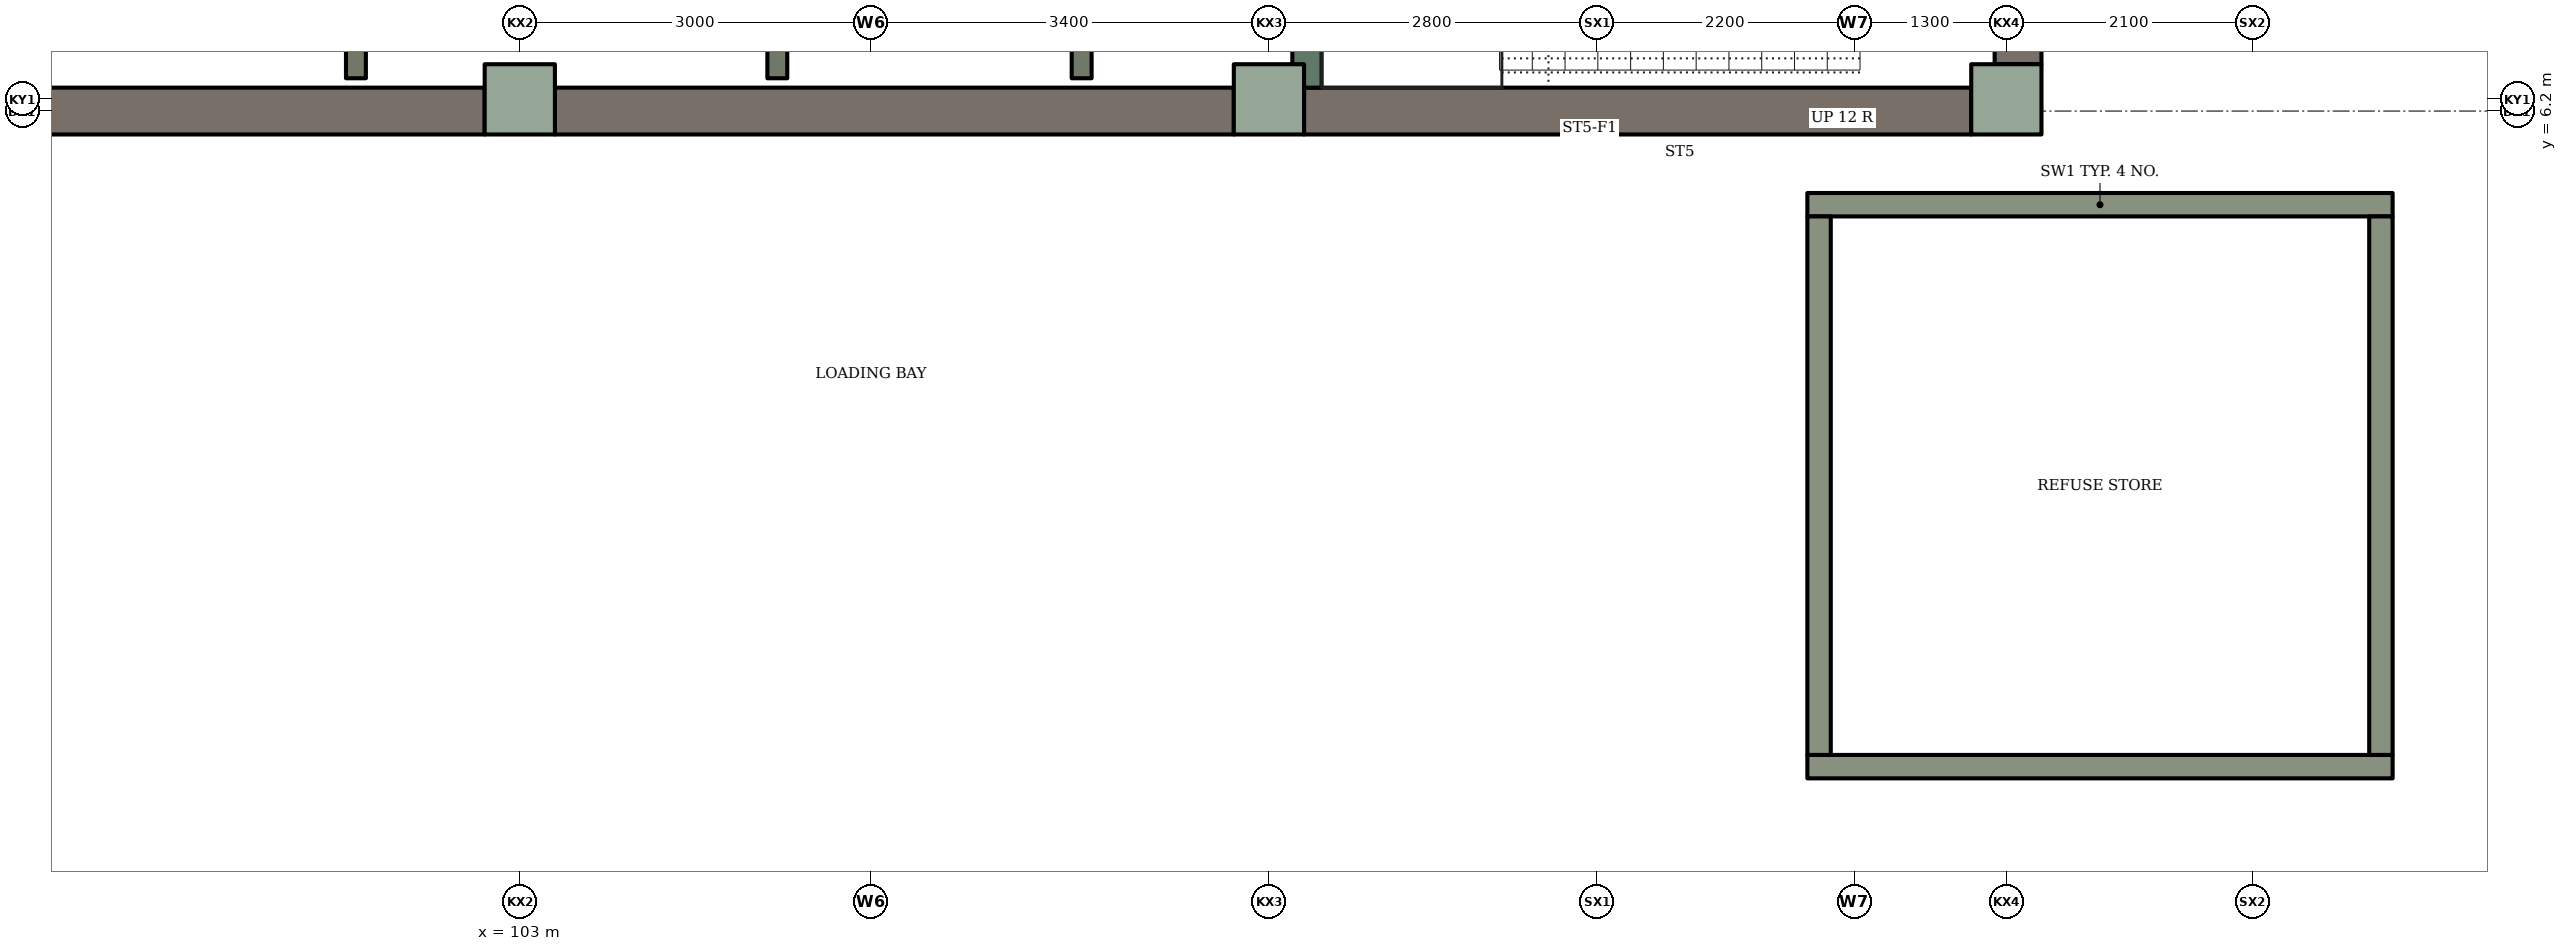
"""IFC4 building model, lengths in metres.
Left out: names, types, materials, properties, quantities, classifications, styles, units other than length and angle.
Written with IfcOpenShell. Run it as: python <this file> out.ifc"""

import sys

from ifc_helpers import new_model, si_unit, direction, frame, frame_2d, origin, origin_2d, place, context, subcontext, project, spatial, rectangle, extrude, element, fill, save


model = new_model("IFC4")
c1 = context("Model", 3, precision=1e-05, world=origin(), true_north=direction((0.0, 1.0)))
c2 = subcontext(c1, "Body", "Model", "MODEL_VIEW")
j1 = project(units=[si_unit("LENGTHUNIT", "METRE"), si_unit("PLANEANGLEUNIT", "RADIAN")], contexts=[c1])
p1 = place(None, origin())
s1 = spatial("IfcSite", under=j1, at=p1, CompositionType="ELEMENT")
p2 = place(p1, origin())
s2 = spatial("IfcBuilding", under=s1, at=p2, CompositionType="ELEMENT")
p3 = place(p2, origin())
s3 = spatial("IfcBuildingStorey", under=s2, at=p3, CompositionType="ELEMENT", Elevation=0.0)
for number, where, z_axis, x_axis in (
    (1, (103.0, 6.3, 0.0), (0.0, 0.0, 1.0), (1.0, 0.0, 0.0)),
    (2, (109.4, 6.3, 0.0), (0.0, 0.0, 1.0), (1.0, 0.0, 0.0)),
    (3, (115.7, 6.3, 0.0), (0.0, 0.0, 1.0), (1.0, 0.0, 0.0)),
):
    element("IfcColumn", number, at=place(p3, frame(where, z_axis=z_axis, x_axis=x_axis)), inside=s3, PredefinedType="COLUMN", context=c2, shape_type="SweptSolid", body=[
        extrude(rectangle(XDim=0.6, YDim=0.6, at=origin_2d()), origin(), (0.0, 0.0, 1.0), 4.2),
    ])
p4 = place(p3, frame((97.0, 6.2, 0.0), z_axis=(0.0, 0.0, 1.0), x_axis=(1.0, 0.0, 0.0)))
e4 = element("IfcWall", 4, at=p4, inside=s3, PredefinedType="SOLIDWALL", context=c2, shape_type="SweptSolid", body=[
    extrude(rectangle(XDim=5.7, YDim=0.4, at=frame_2d((2.85, 0.0))), origin(), (0.0, 0.0, 1.0), 4.2),
])
p5 = place(p4, frame((1.35, 0.0, 0.0)))
e5 = element("IfcOpeningElement", 5, at=p5, cuts=e4, PredefinedType="OPENING", context=c2, shape_type="SweptSolid", body=[
    extrude(rectangle(XDim=3.0, YDim=3.0, at=frame_2d((1.5, 1.5))), frame((0.0, 0.21, 0.0), z_axis=(0.0, -1.0, 0.0), x_axis=(1.0, 0.0, 0.0)), (0.0, 0.0, 1.0), 0.42),
])
p6 = place(p3, frame((103.3, 6.2, 0.0), z_axis=(0.0, 0.0, 1.0), x_axis=(1.0, 0.0, 0.0)))
e6 = element("IfcWall", 6, at=p6, inside=s3, PredefinedType="SOLIDWALL", context=c2, shape_type="SweptSolid", body=[
    extrude(rectangle(XDim=5.8, YDim=0.4, at=frame_2d((2.9, 0.0))), origin(), (0.0, 0.0, 1.0), 4.2),
])
p7 = place(p6, frame((4.6, 0.0, 0.0)))
e7 = element("IfcOpeningElement", 7, at=p7, cuts=e6, PredefinedType="OPENING", context=c2, shape_type="SweptSolid", body=[
    extrude(rectangle(XDim=1.0, YDim=2.1, at=frame_2d((0.5, 1.05))), frame((0.0, 0.21, 0.0), z_axis=(0.0, -1.0, 0.0), x_axis=(1.0, 0.0, 0.0)), (0.0, 0.0, 1.0), 0.42),
])
p8 = place(p3, frame((109.7, 6.2, 0.0), z_axis=(0.0, 0.0, 1.0), x_axis=(1.0, 0.0, 0.0)))
e8 = element("IfcWall", 8, at=p8, inside=s3, PredefinedType="SOLIDWALL", context=c2, shape_type="SweptSolid", body=[
    extrude(rectangle(XDim=5.7, YDim=0.4, at=frame_2d((2.85, 0.0))), origin(), (0.0, 0.0, 1.0), 4.2),
])
p9 = place(p3, frame((115.8, 12.3, 0.0), z_axis=(0.0, 0.0, 1.0), x_axis=(0.0, -1.0, 0.0)))
e9 = element("IfcWall", 9, at=p9, inside=s3, PredefinedType="SOLIDWALL", context=c2, shape_type="SweptSolid", body=[
    extrude(rectangle(XDim=5.7, YDim=0.4, at=frame_2d((2.85, 0.0))), origin(), (0.0, 0.0, 1.0), 4.2),
])
p10 = place(p9, frame((1.6, 0.0, 0.0)))
e10 = element("IfcOpeningElement", 10, at=p10, cuts=e9, PredefinedType="OPENING", context=c2, shape_type="SweptSolid", body=[
    extrude(rectangle(XDim=1.0, YDim=2.4, at=frame_2d((0.5, 1.2))), frame((0.0, 0.21, 0.0), z_axis=(0.0, -1.0, 0.0), x_axis=(1.0, 0.0, 0.0)), (0.0, 0.0, 1.0), 0.42),
])
p11 = place(p3, frame((109.725, 6.4, 0.0), z_axis=(0.0, 0.0, 1.0), x_axis=(0.0, 1.0, 0.0)))
e11 = element("IfcWall", 11, at=p11, inside=s3, PredefinedType="SHEAR", context=c2, shape_type="SweptSolid", body=[
    extrude(rectangle(XDim=5.75, YDim=0.25, at=frame_2d((2.875, 0.0))), origin(), (0.0, 0.0, 1.0), 4.2),
])
for number, where, z_axis, x_axis in (
    (12, (114.0, 0.6, 0.0), (0.0, 0.0, 1.0), (1.0, 0.0, 0.0)),
    (13, (114.0, 5.4, 0.0), (0.0, 0.0, 1.0), (1.0, 0.0, 0.0)),
):
    element("IfcWall", number, at=place(p3, frame(where, z_axis=z_axis, x_axis=x_axis)), inside=s3, PredefinedType="SOLIDWALL", context=c2, shape_type="SweptSolid", body=[
        extrude(rectangle(XDim=5.0, YDim=0.2, at=frame_2d((2.5, 0.0))), origin(), (0.0, 0.0, 1.0), 2.4),
    ])
p12 = place(p3, frame((114.1, 0.7, 0.0), z_axis=(0.0, 0.0, 1.0), x_axis=(0.0, 1.0, 0.0)))
e14 = element("IfcWall", 14, at=p12, inside=s3, PredefinedType="SOLIDWALL", context=c2, shape_type="SweptSolid", body=[
    extrude(rectangle(XDim=4.6, YDim=0.2, at=frame_2d((2.3, 0.0))), origin(), (0.0, 0.0, 1.0), 2.4),
])
p13 = place(p12, frame((1.4, 0.0, 0.0)))
e15 = element("IfcOpeningElement", 15, at=p13, cuts=e14, PredefinedType="OPENING", context=c2, shape_type="SweptSolid", body=[
    extrude(rectangle(XDim=1.8, YDim=2.1, at=frame_2d((0.9, 1.05))), frame((0.0, 0.11, 0.0), z_axis=(0.0, -1.0, 0.0), x_axis=(1.0, 0.0, 0.0)), (0.0, 0.0, 1.0), 0.22),
])
p14 = place(p3, frame((118.9, 0.7, 0.0), z_axis=(0.0, 0.0, 1.0), x_axis=(0.0, 1.0, 0.0)))
e16 = element("IfcWall", 16, at=p14, inside=s3, PredefinedType="SOLIDWALL", context=c2, shape_type="SweptSolid", body=[
    extrude(rectangle(XDim=4.6, YDim=0.2, at=frame_2d((2.3, 0.0))), origin(), (0.0, 0.0, 1.0), 2.4),
])
p15 = place(p3, frame((101.6, 6.48, 0.0), z_axis=(0.0, 0.0, 1.0), x_axis=(0.0, 1.0, 0.0)))
e17 = element("IfcWall", 17, at=p15, inside=s3, PredefinedType="PARTITIONING", context=c2, shape_type="SweptSolid", body=[
    extrude(rectangle(XDim=5.92, YDim=0.17, at=frame_2d((2.96, 0.0))), origin(), (0.0, 0.0, 1.0), 3.92),
])
p16 = place(p15, frame((2.57, 0.0, 0.0)))
e18 = element("IfcOpeningElement", 18, at=p16, cuts=e17, PredefinedType="OPENING", context=c2, shape_type="SweptSolid", body=[
    extrude(rectangle(XDim=0.8, YDim=2.1, at=frame_2d((0.4, 1.05))), frame((0.0, 0.095, 0.0), z_axis=(0.0, -1.0, 0.0), x_axis=(1.0, 0.0, 0.0)), (0.0, 0.0, 1.0), 0.19),
])
p17 = place(p3, frame((102.78, 6.4, 0.0), z_axis=(0.0, 0.0, 1.0), x_axis=(1.0, 0.0, 0.0)))
e19 = element("IfcWall", 19, at=p17, inside=s3, PredefinedType="PARTITIONING", context=c2, shape_type="SweptSolid", body=[
    extrude(rectangle(XDim=0.44, YDim=0.17, at=frame_2d((0.22, 0.0))), origin(), (0.0, 0.0, 1.0), 3.92),
])
p18 = place(p3, frame((105.2, 6.48, 0.0), z_axis=(0.0, 0.0, 1.0), x_axis=(0.0, 1.0, 0.0)))
e20 = element("IfcWall", 20, at=p18, inside=s3, PredefinedType="PARTITIONING", context=c2, shape_type="SweptSolid", body=[
    extrude(rectangle(XDim=5.92, YDim=0.17, at=frame_2d((2.96, 0.0))), origin(), (0.0, 0.0, 1.0), 3.92),
])
p19 = place(p18, frame((2.57, 0.0, 0.0)))
e21 = element("IfcOpeningElement", 21, at=p19, cuts=e20, PredefinedType="OPENING", context=c2, shape_type="SweptSolid", body=[
    extrude(rectangle(XDim=0.8, YDim=2.1, at=frame_2d((0.4, 1.05))), frame((0.0, 0.095, 0.0), z_axis=(0.0, -1.0, 0.0), x_axis=(1.0, 0.0, 0.0)), (0.0, 0.0, 1.0), 0.19),
])
p20 = place(p3, frame((107.8, 6.48, 0.0), z_axis=(0.0, 0.0, 1.0), x_axis=(0.0, 1.0, 0.0)))
e22 = element("IfcWall", 22, at=p20, inside=s3, PredefinedType="PARTITIONING", context=c2, shape_type="SweptSolid", body=[
    extrude(rectangle(XDim=5.92, YDim=0.17, at=frame_2d((2.96, 0.0))), origin(), (0.0, 0.0, 1.0), 3.92),
])
p21 = place(p3, frame((109.18, 6.4, 0.0), z_axis=(0.0, 0.0, 1.0), x_axis=(1.0, 0.0, 0.0)))
e23 = element("IfcWall", 23, at=p21, inside=s3, PredefinedType="PARTITIONING", context=c2, shape_type="SweptSolid", body=[
    extrude(rectangle(XDim=0.34, YDim=0.17, at=frame_2d((0.17, 0.0))), origin(), (0.0, 0.0, 1.0), 3.92),
])
p22 = place(p5, origin())
e24 = element("IfcDoor", 24, at=p22, inside=s3, OperationType="ROLLINGUP", PredefinedType="DOOR", context=c2, shape_type="SweptSolid", body=[
    extrude(rectangle(XDim=3.0, YDim=3.0, at=frame_2d((1.5, 1.5))), frame((0.0, 0.025, 0.0), z_axis=(0.0, -1.0, 0.0), x_axis=(1.0, 0.0, 0.0)), (0.0, 0.0, 1.0), 0.05),
])
fill(e5, e24)
p23 = place(p7, origin())
e25 = element("IfcDoor", 25, at=p23, inside=s3, OperationType="SINGLE_SWING_LEFT", PredefinedType="DOOR", context=c2, shape_type="SweptSolid", body=[
    extrude(rectangle(XDim=1.0, YDim=2.1, at=frame_2d((0.5, 1.05))), frame((0.0, 0.025, 0.0), z_axis=(0.0, -1.0, 0.0), x_axis=(1.0, 0.0, 0.0)), (0.0, 0.0, 1.0), 0.05),
])
fill(e7, e25)
p24 = place(p13, origin())
e26 = element("IfcDoor", 26, at=p24, inside=s3, OperationType="DOUBLE_DOOR_SINGLE_SWING", PredefinedType="GATE", context=c2, shape_type="SweptSolid", body=[
    extrude(rectangle(XDim=1.8, YDim=2.1, at=frame_2d((0.9, 1.05))), frame((0.0, 0.025, 0.0), z_axis=(0.0, -1.0, 0.0), x_axis=(1.0, 0.0, 0.0)), (0.0, 0.0, 1.0), 0.05),
])
fill(e15, e26)
save(model, sys.argv[1])
